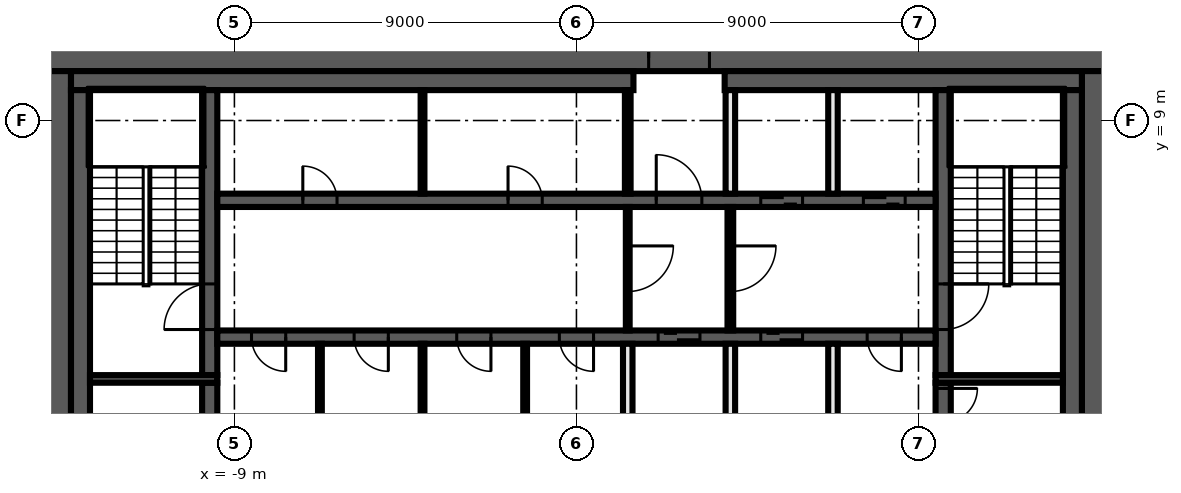
"""IFC4 building model, lengths in metres.
Left out: names, types, materials, properties, quantities, classifications, styles, units other than length and angle.
Written with IfcOpenShell. Run it as: python <this file> out.ifc"""

import sys

from ifc_helpers import new_model, si_unit, direction, frame, frame_2d, origin, place, context, subcontext, project, spatial, rectangle, extrude, element, fill, save


model = new_model("IFC4")
c1 = context("Model", 3, precision=1e-05, world=origin(), true_north=direction((0.0, 1.0)))
c2 = subcontext(c1, "Body", "Model", "MODEL_VIEW")
j1 = project(units=[si_unit("LENGTHUNIT", "METRE"), si_unit("PLANEANGLEUNIT", "RADIAN")], contexts=[c1])
p1 = place(None, origin())
s1 = spatial("IfcSite", under=j1, at=p1, CompositionType="ELEMENT")
p2 = place(p1, origin())
s2 = spatial("IfcBuilding", under=s1, at=p2, CompositionType="ELEMENT")
p3 = place(p2, frame((0.0, 0.0, 270.6)))
s3 = spatial("IfcBuildingStorey", under=s2, at=p3, CompositionType="ELEMENT", Elevation=270.6)
p4 = place(p3, frame((-14.0, 10.65, 0.0), z_axis=(0.0, 0.0, 1.0), x_axis=(1.0, 0.0, 0.0)))
e1 = element("IfcWall", 1, at=p4, inside=s3, PredefinedType="SHEAR", context=c2, shape_type="SweptSolid", body=[
    extrude(rectangle(XDim=28.0, YDim=0.7, at=frame_2d((14.0, 0.0))), origin(), (0.0, 0.0, 1.0), 3.82),
])
p5 = place(p4, frame((15.9, 0.0, 0.0)))
e2 = element("IfcOpeningElement", 2, at=p5, cuts=e1, PredefinedType="OPENING", context=c2, shape_type="SweptSolid", body=[
    extrude(rectangle(XDim=1.6, YDim=2.1, at=frame_2d((0.8, 1.05))), frame((0.0, 0.36, 0.0), z_axis=(0.0, -1.0, 0.0), x_axis=(1.0, 0.0, 0.0)), (0.0, 0.0, 1.0), 0.72),
])
for number, where, z_axis, x_axis in (
    (3, (13.65, 10.3, 0.0), (0.0, 0.0, 1.0), (0.0, -1.0, 0.0)),
    (4, (-13.65, -10.3, 0.0), (0.0, 0.0, 1.0), (0.0, 1.0, 0.0)),
):
    element("IfcWall", number, at=place(p3, frame(where, z_axis=z_axis, x_axis=x_axis)), inside=s3, PredefinedType="SHEAR", context=c2, shape_type="SweptSolid", body=[
        extrude(rectangle(XDim=20.6, YDim=0.7, at=frame_2d((10.3, 0.0))), origin(), (0.0, 0.0, 1.0), 3.82),
    ])
p6 = place(p3, frame((-13.3, 10.05, 0.0), z_axis=(0.0, 0.0, 1.0), x_axis=(1.0, 0.0, 0.0)))
e5 = element("IfcWall", 5, at=p6, inside=s3, PredefinedType="SHEAR", context=c2, shape_type="SweptSolid", body=[
    extrude(rectangle(XDim=14.8, YDim=0.5, at=frame_2d((7.4, 0.0))), origin(), (0.0, 0.0, 1.0), 3.82),
])
p7 = place(p3, frame((3.9, 10.05, 0.0), z_axis=(0.0, 0.0, 1.0), x_axis=(1.0, 0.0, 0.0)))
e6 = element("IfcWall", 6, at=p7, inside=s3, PredefinedType="SHEAR", context=c2, shape_type="SweptSolid", body=[
    extrude(rectangle(XDim=9.4, YDim=0.5, at=frame_2d((4.7, 0.0))), origin(), (0.0, 0.0, 1.0), 3.82),
])
for number, where, z_axis, x_axis in (
    (7, (13.05, 9.8, 0.0), (0.0, 0.0, 1.0), (0.0, -1.0, 0.0)),
    (8, (-13.05, -9.8, 0.0), (0.0, 0.0, 1.0), (0.0, 1.0, 0.0)),
):
    element("IfcWall", number, at=place(p3, frame(where, z_axis=z_axis, x_axis=x_axis)), inside=s3, PredefinedType="SHEAR", context=c2, shape_type="SweptSolid", body=[
        extrude(rectangle(XDim=19.6, YDim=0.5, at=frame_2d((9.8, 0.0))), origin(), (0.0, 0.0, 1.0), 3.82),
    ])
p8 = place(p3, frame((9.65, 2.1, 0.0), z_axis=(0.0, 0.0, 1.0), x_axis=(0.0, -1.0, 0.0)))
e9 = element("IfcWall", 9, at=p8, inside=s3, PredefinedType="SHEAR", context=c2, shape_type="SweptSolid", body=[
    extrude(rectangle(XDim=4.2, YDim=0.4, at=frame_2d((2.1, 0.0))), origin(), (0.0, 0.0, 1.0), 3.82),
])
p9 = place(p8, frame((0.15, 0.0, 0.0)))
e10 = element("IfcOpeningElement", 10, at=p9, cuts=e9, PredefinedType="OPENING", context=c2, shape_type="SweptSolid", body=[
    extrude(rectangle(XDim=0.9, YDim=2.1, at=frame_2d((0.45, 1.05))), frame((0.0, 0.21, 0.0), z_axis=(0.0, -1.0, 0.0), x_axis=(1.0, 0.0, 0.0)), (0.0, 0.0, 1.0), 0.42),
])
p10 = place(p3, frame((9.65, 9.8, 0.0), z_axis=(0.0, 0.0, 1.0), x_axis=(0.0, -1.0, 0.0)))
e11 = element("IfcWall", 11, at=p10, inside=s3, PredefinedType="SHEAR", context=c2, shape_type="SweptSolid", body=[
    extrude(rectangle(XDim=7.5, YDim=0.4, at=frame_2d((3.75, 0.0))), origin(), (0.0, 0.0, 1.0), 3.82),
])
p11 = place(p10, frame((5.1, 0.0, 0.0)))
e12 = element("IfcOpeningElement", 12, at=p11, cuts=e11, PredefinedType="OPENING", context=c2, shape_type="SweptSolid", body=[
    extrude(rectangle(XDim=1.2, YDim=2.1, at=frame_2d((0.6, 1.05))), frame((0.0, 0.21, 0.0), z_axis=(0.0, -1.0, 0.0), x_axis=(1.0, 0.0, 0.0)), (0.0, 0.0, 1.0), 0.42),
])
p12 = place(p3, frame((-9.65, -2.1, 0.0), z_axis=(0.0, 0.0, 1.0), x_axis=(0.0, 1.0, 0.0)))
e13 = element("IfcWall", 13, at=p12, inside=s3, PredefinedType="SHEAR", context=c2, shape_type="SweptSolid", body=[
    extrude(rectangle(XDim=4.2, YDim=0.4, at=frame_2d((2.1, 0.0))), origin(), (0.0, 0.0, 1.0), 3.82),
])
p13 = place(p3, frame((-9.65, 2.3, 0.0), z_axis=(0.0, 0.0, 1.0), x_axis=(0.0, 1.0, 0.0)))
e14 = element("IfcWall", 14, at=p13, inside=s3, PredefinedType="SHEAR", context=c2, shape_type="SweptSolid", body=[
    extrude(rectangle(XDim=7.5, YDim=0.4, at=frame_2d((3.75, 0.0))), origin(), (0.0, 0.0, 1.0), 3.82),
])
p14 = place(p13, frame((1.2, 0.0, 0.0)))
e15 = element("IfcOpeningElement", 15, at=p14, cuts=e14, PredefinedType="OPENING", context=c2, shape_type="SweptSolid", body=[
    extrude(rectangle(XDim=1.2, YDim=2.1, at=frame_2d((0.6, 1.05))), frame((0.0, 0.21, 0.0), z_axis=(0.0, -1.0, 0.0), x_axis=(1.0, 0.0, 0.0)), (0.0, 0.0, 1.0), 0.42),
])
for number, where, z_axis, x_axis in (
    (16, (9.45, 2.2, 0.0), (0.0, 0.0, 1.0), (1.0, 0.0, 0.0)),
    (17, (-9.45, 2.2, 0.0), (0.0, 0.0, 1.0), (-1.0, 0.0, 0.0)),
):
    element("IfcWall", number, at=place(p3, frame(where, z_axis=z_axis, x_axis=x_axis)), inside=s3, PredefinedType="SHEAR", context=c2, shape_type="SweptSolid", body=[
        extrude(rectangle(XDim=3.35, YDim=0.2, at=frame_2d((1.675, 0.0))), origin(), (0.0, 0.0, 1.0), 3.82),
    ])
p15 = place(p3, frame((-9.45, 6.9, 0.0), z_axis=(0.0, 0.0, 1.0), x_axis=(1.0, 0.0, 0.0)))
e18 = element("IfcWall", 18, at=p15, inside=s3, PredefinedType="SHEAR", context=c2, shape_type="SweptSolid", body=[
    extrude(rectangle(XDim=18.9, YDim=0.35, at=frame_2d((9.45, 0.0))), origin(), (0.0, 0.0, 1.0), 3.82),
])
p16 = place(p15, frame((11.55, 0.0, 0.0)))
e19 = element("IfcOpeningElement", 19, at=p16, cuts=e18, PredefinedType="OPENING", context=c2, shape_type="SweptSolid", body=[
    extrude(rectangle(XDim=1.2, YDim=2.1, at=frame_2d((0.6, 1.05))), frame((0.0, 0.185, 0.0), z_axis=(0.0, -1.0, 0.0), x_axis=(1.0, 0.0, 0.0)), (0.0, 0.0, 1.0), 0.37),
])
p17 = place(p15, frame((14.3, 0.0, 0.0)))
e20 = element("IfcOpeningElement", 20, at=p17, cuts=e18, PredefinedType="OPENING", context=c2, shape_type="SweptSolid", body=[
    extrude(rectangle(XDim=1.1, YDim=2.1, at=frame_2d((0.55, 1.05))), frame((0.0, 0.185, 0.0), z_axis=(0.0, -1.0, 0.0), x_axis=(1.0, 0.0, 0.0)), (0.0, 0.0, 1.0), 0.37),
])
p18 = place(p15, frame((17.0, 0.0, 0.0)))
e21 = element("IfcOpeningElement", 21, at=p18, cuts=e18, PredefinedType="OPENING", context=c2, shape_type="SweptSolid", body=[
    extrude(rectangle(XDim=1.1, YDim=2.1, at=frame_2d((0.55, 1.05))), frame((0.0, 0.185, 0.0), z_axis=(0.0, -1.0, 0.0), x_axis=(1.0, 0.0, 0.0)), (0.0, 0.0, 1.0), 0.37),
])
p19 = place(p15, frame((2.25, 0.0, 0.0)))
e22 = element("IfcOpeningElement", 22, at=p19, cuts=e18, PredefinedType="OPENING", context=c2, shape_type="SweptSolid", body=[
    extrude(rectangle(XDim=0.9, YDim=2.1, at=frame_2d((0.45, 1.05))), frame((0.0, 0.185, 0.0), z_axis=(0.0, -1.0, 0.0), x_axis=(1.0, 0.0, 0.0)), (0.0, 0.0, 1.0), 0.37),
])
p20 = place(p15, frame((7.65, 0.0, 0.0)))
e23 = element("IfcOpeningElement", 23, at=p20, cuts=e18, PredefinedType="OPENING", context=c2, shape_type="SweptSolid", body=[
    extrude(rectangle(XDim=0.9, YDim=2.1, at=frame_2d((0.45, 1.05))), frame((0.0, 0.185, 0.0), z_axis=(0.0, -1.0, 0.0), x_axis=(1.0, 0.0, 0.0)), (0.0, 0.0, 1.0), 0.37),
])
p21 = place(p3, frame((9.45, 3.3, 0.0), z_axis=(0.0, 0.0, 1.0), x_axis=(-1.0, 0.0, 0.0)))
e24 = element("IfcWall", 24, at=p21, inside=s3, PredefinedType="SHEAR", context=c2, shape_type="SweptSolid", body=[
    extrude(rectangle(XDim=18.9, YDim=0.35, at=frame_2d((9.45, 0.0))), origin(), (0.0, 0.0, 1.0), 3.82),
])
p22 = place(p21, frame((6.2, 0.0, 0.0)))
e25 = element("IfcOpeningElement", 25, at=p22, cuts=e24, PredefinedType="OPENING", context=c2, shape_type="SweptSolid", body=[
    extrude(rectangle(XDim=1.1, YDim=2.1, at=frame_2d((0.55, 1.05))), frame((0.0, 0.185, 0.0), z_axis=(0.0, -1.0, 0.0), x_axis=(1.0, 0.0, 0.0)), (0.0, 0.0, 1.0), 0.37),
])
p23 = place(p21, frame((3.5, 0.0, 0.0)))
e26 = element("IfcOpeningElement", 26, at=p23, cuts=e24, PredefinedType="OPENING", context=c2, shape_type="SweptSolid", body=[
    extrude(rectangle(XDim=1.1, YDim=2.1, at=frame_2d((0.55, 1.05))), frame((0.0, 0.185, 0.0), z_axis=(0.0, -1.0, 0.0), x_axis=(1.0, 0.0, 0.0)), (0.0, 0.0, 1.0), 0.37),
])
p24 = place(p21, frame((0.9, 0.0, 0.0)))
e27 = element("IfcOpeningElement", 27, at=p24, cuts=e24, PredefinedType="OPENING", context=c2, shape_type="SweptSolid", body=[
    extrude(rectangle(XDim=0.9, YDim=2.1, at=frame_2d((0.45, 1.05))), frame((0.0, 0.185, 0.0), z_axis=(0.0, -1.0, 0.0), x_axis=(1.0, 0.0, 0.0)), (0.0, 0.0, 1.0), 0.37),
])
p25 = place(p21, frame((17.1, 0.0, 0.0)))
e28 = element("IfcOpeningElement", 28, at=p25, cuts=e24, PredefinedType="OPENING", context=c2, shape_type="SweptSolid", body=[
    extrude(rectangle(XDim=0.9, YDim=2.1, at=frame_2d((0.45, 1.05))), frame((0.0, 0.185, 0.0), z_axis=(0.0, -1.0, 0.0), x_axis=(1.0, 0.0, 0.0)), (0.0, 0.0, 1.0), 0.37),
])
p26 = place(p21, frame((14.4, 0.0, 0.0)))
e29 = element("IfcOpeningElement", 29, at=p26, cuts=e24, PredefinedType="OPENING", context=c2, shape_type="SweptSolid", body=[
    extrude(rectangle(XDim=0.9, YDim=2.1, at=frame_2d((0.45, 1.05))), frame((0.0, 0.185, 0.0), z_axis=(0.0, -1.0, 0.0), x_axis=(1.0, 0.0, 0.0)), (0.0, 0.0, 1.0), 0.37),
])
p27 = place(p21, frame((11.7, 0.0, 0.0)))
e30 = element("IfcOpeningElement", 30, at=p27, cuts=e24, PredefinedType="OPENING", context=c2, shape_type="SweptSolid", body=[
    extrude(rectangle(XDim=0.9, YDim=2.1, at=frame_2d((0.45, 1.05))), frame((0.0, 0.185, 0.0), z_axis=(0.0, -1.0, 0.0), x_axis=(1.0, 0.0, 0.0)), (0.0, 0.0, 1.0), 0.37),
])
p28 = place(p21, frame((9.0, 0.0, 0.0)))
e31 = element("IfcOpeningElement", 31, at=p28, cuts=e24, PredefinedType="OPENING", context=c2, shape_type="SweptSolid", body=[
    extrude(rectangle(XDim=0.9, YDim=2.1, at=frame_2d((0.45, 1.05))), frame((0.0, 0.185, 0.0), z_axis=(0.0, -1.0, 0.0), x_axis=(1.0, 0.0, 0.0)), (0.0, 0.0, 1.0), 0.37),
])
for number, where, z_axis, x_axis in (
    (32, (6.75, 0.4, 0.0), (0.0, 0.0, 1.0), (0.0, 1.0, 0.0)),
    (33, (6.75, 7.075, 0.0), (0.0, 0.0, 1.0), (0.0, 1.0, 0.0)),
):
    element("IfcWall", number, at=place(p3, frame(where, z_axis=z_axis, x_axis=x_axis)), inside=s3, PredefinedType="SOLIDWALL", context=c2, shape_type="SweptSolid", body=[
        extrude(rectangle(XDim=2.725, YDim=0.25, at=frame_2d((1.363, 0.0))), origin(), (0.0, 0.0, 1.0), 3.82),
    ])
p29 = place(p3, frame((4.05, 6.725, 0.0), z_axis=(0.0, 0.0, 1.0), x_axis=(0.0, -1.0, 0.0)))
e34 = element("IfcWall", 34, at=p29, inside=s3, PredefinedType="PARTITIONING", context=c2, shape_type="SweptSolid", body=[
    extrude(rectangle(XDim=3.25, YDim=0.15, at=frame_2d((1.625, 0.0))), origin(), (0.0, 0.0, 1.0), 3.82),
])
p30 = place(p29, frame((1.025, 0.0, 0.0)))
e35 = element("IfcOpeningElement", 35, at=p30, cuts=e34, PredefinedType="OPENING", context=c2, shape_type="SweptSolid", body=[
    extrude(rectangle(XDim=1.2, YDim=2.1, at=frame_2d((0.6, 1.05))), frame((0.0, 0.085, 0.0), z_axis=(0.0, -1.0, 0.0), x_axis=(1.0, 0.0, 0.0)), (0.0, 0.0, 1.0), 0.17),
])
for number, where, z_axis, x_axis in (
    (36, (4.05, 0.4, 0.0), (0.0, 0.0, 1.0), (0.0, 1.0, 0.0)),
    (37, (4.05, 7.075, 0.0), (0.0, 0.0, 1.0), (0.0, 1.0, 0.0)),
):
    element("IfcWall", number, at=place(p3, frame(where, z_axis=z_axis, x_axis=x_axis)), inside=s3, PredefinedType="SOLIDWALL", context=c2, shape_type="SweptSolid", body=[
        extrude(rectangle(XDim=2.725, YDim=0.25, at=frame_2d((1.363, 0.0))), origin(), (0.0, 0.0, 1.0), 3.82),
    ])
p31 = place(p3, frame((1.35, 7.075, 0.0), z_axis=(0.0, 0.0, 1.0), x_axis=(0.0, 1.0, 0.0)))
e38 = element("IfcWall", 38, at=p31, inside=s3, PredefinedType="PARTITIONING", context=c2, shape_type="SweptSolid", body=[
    extrude(rectangle(XDim=2.725, YDim=0.15, at=frame_2d((1.363, 0.0))), origin(), (0.0, 0.0, 1.0), 3.82),
])
p32 = place(p3, frame((1.35, 6.725, 0.0), z_axis=(0.0, 0.0, 1.0), x_axis=(0.0, -1.0, 0.0)))
e39 = element("IfcWall", 39, at=p32, inside=s3, PredefinedType="PARTITIONING", context=c2, shape_type="SweptSolid", body=[
    extrude(rectangle(XDim=3.25, YDim=0.1, at=frame_2d((1.625, 0.0))), origin(), (0.0, 0.0, 1.0), 3.82),
])
p33 = place(p32, frame((1.025, 0.0, 0.0)))
e40 = element("IfcOpeningElement", 40, at=p33, cuts=e39, PredefinedType="OPENING", context=c2, shape_type="SweptSolid", body=[
    extrude(rectangle(XDim=1.2, YDim=2.1, at=frame_2d((0.6, 1.05))), frame((0.0, 0.06, 0.0), z_axis=(0.0, -1.0, 0.0), x_axis=(1.0, 0.0, 0.0)), (0.0, 0.0, 1.0), 0.12),
])
p34 = place(p3, frame((1.35, 0.4, 0.0), z_axis=(0.0, 0.0, 1.0), x_axis=(0.0, 1.0, 0.0)))
e41 = element("IfcWall", 41, at=p34, inside=s3, PredefinedType="SOLIDWALL", context=c2, shape_type="SweptSolid", body=[
    extrude(rectangle(XDim=2.725, YDim=0.25, at=frame_2d((1.363, 0.0))), origin(), (0.0, 0.0, 1.0), 3.82),
])
for number, where, z_axis, x_axis in (
    (42, (-1.35, 0.4, 0.0), (0.0, 0.0, 1.0), (0.0, 1.0, 0.0)),
    (43, (-4.05, 0.4, 0.0), (0.0, 0.0, 1.0), (0.0, 1.0, 0.0)),
    (44, (-4.05, 7.075, 0.0), (0.0, 0.0, 1.0), (0.0, 1.0, 0.0)),
    (45, (-6.75, 0.4, 0.0), (0.0, 0.0, 1.0), (0.0, 1.0, 0.0)),
):
    element("IfcWall", number, at=place(p3, frame(where, z_axis=z_axis, x_axis=x_axis)), inside=s3, PredefinedType="PARTITIONING", context=c2, shape_type="SweptSolid", body=[
        extrude(rectangle(XDim=2.725, YDim=0.1, at=frame_2d((1.363, 0.0))), origin(), (0.0, 0.0, 1.0), 3.82),
    ])
p35 = place(p9, origin())
e46 = element("IfcDoor", 46, at=p35, inside=s3, OperationType="SINGLE_SWING_RIGHT", PredefinedType="DOOR", context=c2, shape_type="SweptSolid", body=[
    extrude(rectangle(XDim=0.9, YDim=2.1, at=frame_2d((0.45, 1.05))), frame((0.0, 0.025, 0.0), z_axis=(0.0, -1.0, 0.0), x_axis=(1.0, 0.0, 0.0)), (0.0, 0.0, 1.0), 0.05),
])
fill(e10, e46)
p36 = place(p5, origin())
e47 = element("IfcDoor", 47, at=p36, inside=s3, OperationType="DOUBLE_DOOR_SINGLE_SWING", PredefinedType="DOOR", context=c2, shape_type="SweptSolid", body=[
    extrude(rectangle(XDim=1.6, YDim=2.1, at=frame_2d((0.8, 1.05))), frame((0.0, 0.025, 0.0), z_axis=(0.0, -1.0, 0.0), x_axis=(1.0, 0.0, 0.0)), (0.0, 0.0, 1.0), 0.05),
])
fill(e2, e47)
p37 = place(p16, origin())
e48 = element("IfcDoor", 48, at=p37, inside=s3, OperationType="SINGLE_SWING_LEFT", PredefinedType="DOOR", context=c2, shape_type="SweptSolid", body=[
    extrude(rectangle(XDim=1.2, YDim=2.1, at=frame_2d((0.6, 1.05))), frame((0.0, 0.025, 0.0), z_axis=(0.0, -1.0, 0.0), x_axis=(1.0, 0.0, 0.0)), (0.0, 0.0, 1.0), 0.05),
])
fill(e19, e48)
p38 = place(p17, origin())
e49 = element("IfcDoor", 49, at=p38, inside=s3, OperationType="DOUBLE_DOOR_SLIDING", PredefinedType="DOOR", context=c2, shape_type="SweptSolid", body=[
    extrude(rectangle(XDim=1.1, YDim=2.1, at=frame_2d((0.55, 1.05))), frame((0.0, 0.025, 0.0), z_axis=(0.0, -1.0, 0.0), x_axis=(1.0, 0.0, 0.0)), (0.0, 0.0, 1.0), 0.05),
])
fill(e20, e49)
p39 = place(p18, origin())
e50 = element("IfcDoor", 50, at=p39, inside=s3, OperationType="DOUBLE_DOOR_SLIDING", PredefinedType="DOOR", context=c2, shape_type="SweptSolid", body=[
    extrude(rectangle(XDim=1.1, YDim=2.1, at=frame_2d((0.55, 1.05))), frame((0.0, 0.025, 0.0), z_axis=(0.0, -1.0, 0.0), x_axis=(1.0, 0.0, 0.0)), (0.0, 0.0, 1.0), 0.05),
])
fill(e21, e50)
p40 = place(p22, origin())
e51 = element("IfcDoor", 51, at=p40, inside=s3, OperationType="DOUBLE_DOOR_SLIDING", PredefinedType="DOOR", context=c2, shape_type="SweptSolid", body=[
    extrude(rectangle(XDim=1.1, YDim=2.1, at=frame_2d((0.55, 1.05))), frame((0.0, 0.025, 0.0), z_axis=(0.0, -1.0, 0.0), x_axis=(1.0, 0.0, 0.0)), (0.0, 0.0, 1.0), 0.05),
])
fill(e25, e51)
p41 = place(p23, origin())
e52 = element("IfcDoor", 52, at=p41, inside=s3, OperationType="DOUBLE_DOOR_SLIDING", PredefinedType="DOOR", context=c2, shape_type="SweptSolid", body=[
    extrude(rectangle(XDim=1.1, YDim=2.1, at=frame_2d((0.55, 1.05))), frame((0.0, 0.025, 0.0), z_axis=(0.0, -1.0, 0.0), x_axis=(1.0, 0.0, 0.0)), (0.0, 0.0, 1.0), 0.05),
])
fill(e26, e52)
p42 = place(p24, origin())
e53 = element("IfcDoor", 53, at=p42, inside=s3, OperationType="SINGLE_SWING_LEFT", PredefinedType="DOOR", context=c2, shape_type="SweptSolid", body=[
    extrude(rectangle(XDim=0.9, YDim=2.1, at=frame_2d((0.45, 1.05))), frame((0.0, 0.025, 0.0), z_axis=(0.0, -1.0, 0.0), x_axis=(1.0, 0.0, 0.0)), (0.0, 0.0, 1.0), 0.05),
])
fill(e27, e53)
p43 = place(p19, origin())
e54 = element("IfcDoor", 54, at=p43, inside=s3, OperationType="SINGLE_SWING_RIGHT", PredefinedType="DOOR", context=c2, shape_type="SweptSolid", body=[
    extrude(rectangle(XDim=0.9, YDim=2.1, at=frame_2d((0.45, 1.05))), frame((0.0, 0.025, 0.0), z_axis=(0.0, -1.0, 0.0), x_axis=(1.0, 0.0, 0.0)), (0.0, 0.0, 1.0), 0.05),
])
fill(e22, e54)
p44 = place(p20, origin())
e55 = element("IfcDoor", 55, at=p44, inside=s3, OperationType="SINGLE_SWING_LEFT", PredefinedType="DOOR", context=c2, shape_type="SweptSolid", body=[
    extrude(rectangle(XDim=0.9, YDim=2.1, at=frame_2d((0.45, 1.05))), frame((0.0, 0.025, 0.0), z_axis=(0.0, -1.0, 0.0), x_axis=(1.0, 0.0, 0.0)), (0.0, 0.0, 1.0), 0.05),
])
fill(e23, e55)
p45 = place(p25, origin())
e56 = element("IfcDoor", 56, at=p45, inside=s3, OperationType="SINGLE_SWING_RIGHT", PredefinedType="DOOR", context=c2, shape_type="SweptSolid", body=[
    extrude(rectangle(XDim=0.9, YDim=2.1, at=frame_2d((0.45, 1.05))), frame((0.0, 0.025, 0.0), z_axis=(0.0, -1.0, 0.0), x_axis=(1.0, 0.0, 0.0)), (0.0, 0.0, 1.0), 0.05),
])
fill(e28, e56)
p46 = place(p26, origin())
e57 = element("IfcDoor", 57, at=p46, inside=s3, OperationType="SINGLE_SWING_LEFT", PredefinedType="DOOR", context=c2, shape_type="SweptSolid", body=[
    extrude(rectangle(XDim=0.9, YDim=2.1, at=frame_2d((0.45, 1.05))), frame((0.0, 0.025, 0.0), z_axis=(0.0, -1.0, 0.0), x_axis=(1.0, 0.0, 0.0)), (0.0, 0.0, 1.0), 0.05),
])
fill(e29, e57)
p47 = place(p27, origin())
e58 = element("IfcDoor", 58, at=p47, inside=s3, OperationType="SINGLE_SWING_RIGHT", PredefinedType="DOOR", context=c2, shape_type="SweptSolid", body=[
    extrude(rectangle(XDim=0.9, YDim=2.1, at=frame_2d((0.45, 1.05))), frame((0.0, 0.025, 0.0), z_axis=(0.0, -1.0, 0.0), x_axis=(1.0, 0.0, 0.0)), (0.0, 0.0, 1.0), 0.05),
])
fill(e30, e58)
p48 = place(p28, origin())
e59 = element("IfcDoor", 59, at=p48, inside=s3, OperationType="SINGLE_SWING_LEFT", PredefinedType="DOOR", context=c2, shape_type="SweptSolid", body=[
    extrude(rectangle(XDim=0.9, YDim=2.1, at=frame_2d((0.45, 1.05))), frame((0.0, 0.025, 0.0), z_axis=(0.0, -1.0, 0.0), x_axis=(1.0, 0.0, 0.0)), (0.0, 0.0, 1.0), 0.05),
])
fill(e31, e59)
p49 = place(p11, origin())
e60 = element("IfcDoor", 60, at=p49, inside=s3, OperationType="SINGLE_SWING_LEFT", PredefinedType="DOOR", context=c2, shape_type="SweptSolid", body=[
    extrude(rectangle(XDim=1.2, YDim=2.1, at=frame_2d((0.6, 1.05))), frame((0.0, 0.025, 0.0), z_axis=(0.0, -1.0, 0.0), x_axis=(1.0, 0.0, 0.0)), (0.0, 0.0, 1.0), 0.05),
])
fill(e12, e60)
p50 = place(p14, origin())
e61 = element("IfcDoor", 61, at=p50, inside=s3, OperationType="SINGLE_SWING_RIGHT", PredefinedType="DOOR", context=c2, shape_type="SweptSolid", body=[
    extrude(rectangle(XDim=1.2, YDim=2.1, at=frame_2d((0.6, 1.05))), frame((0.0, 0.025, 0.0), z_axis=(0.0, -1.0, 0.0), x_axis=(1.0, 0.0, 0.0)), (0.0, 0.0, 1.0), 0.05),
])
fill(e15, e61)
p51 = place(p33, origin())
e62 = element("IfcDoor", 62, at=p51, inside=s3, OperationType="SINGLE_SWING_LEFT", PredefinedType="DOOR", context=c2, shape_type="SweptSolid", body=[
    extrude(rectangle(XDim=1.2, YDim=2.1, at=frame_2d((0.6, 1.05))), frame((0.0, 0.025, 0.0), z_axis=(0.0, -1.0, 0.0), x_axis=(1.0, 0.0, 0.0)), (0.0, 0.0, 1.0), 0.05),
])
fill(e40, e62)
p52 = place(p30, origin())
e63 = element("IfcDoor", 63, at=p52, inside=s3, OperationType="SINGLE_SWING_RIGHT", PredefinedType="DOOR", context=c2, shape_type="SweptSolid", body=[
    extrude(rectangle(XDim=1.2, YDim=2.1, at=frame_2d((0.6, 1.05))), frame((0.0, 0.025, 0.0), z_axis=(0.0, -1.0, 0.0), x_axis=(1.0, 0.0, 0.0)), (0.0, 0.0, 1.0), 0.05),
])
fill(e35, e63)
save(model, sys.argv[1])
